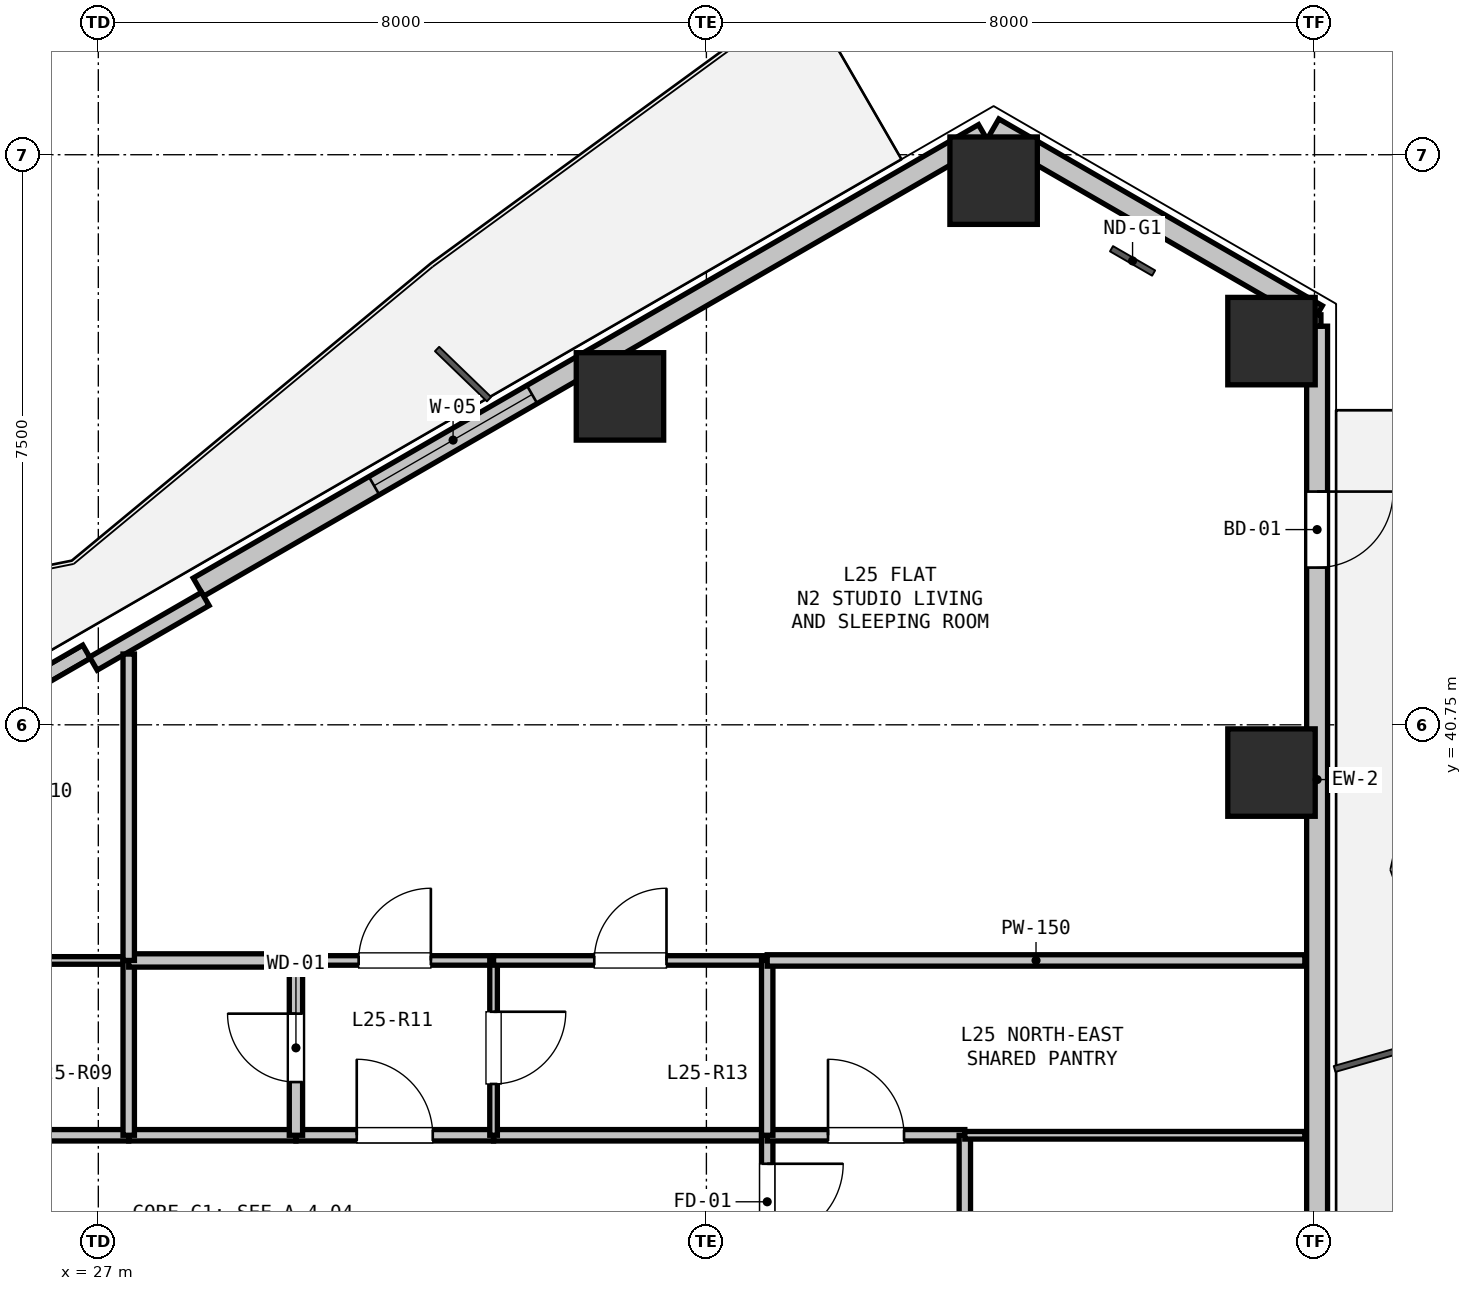
"""IFC4 building model, lengths in metres.
Left out: names, types, materials, properties, quantities, classifications, styles, units other than length and angle.
Written with IfcOpenShell. Run it as: python <this file> out.ifc"""

import sys

from ifc_helpers import new_model, si_unit, direction, frame, frame_2d, origin, origin_2d, place, context, subcontext, project, spatial, rectangle, hollow_rectangle, extrude, element, fill, save


model = new_model("IFC4")
c1 = context("Model", 3, precision=1e-05, world=origin(), true_north=direction((0.0, 1.0)))
c2 = subcontext(c1, "Body", "Model", "MODEL_VIEW")
j1 = project(units=[si_unit("LENGTHUNIT", "METRE"), si_unit("PLANEANGLEUNIT", "RADIAN")], contexts=[c1])
p1 = place(None, origin())
s1 = spatial("IfcSite", under=j1, at=p1, CompositionType="ELEMENT")
p2 = place(p1, origin())
s2 = spatial("IfcBuilding", under=s1, at=p2, CompositionType="ELEMENT")
p3 = place(p2, frame((0.0, 0.0, 93.3)))
s3 = spatial("IfcBuildingStorey", under=s2, at=p3, CompositionType="ELEMENT", Elevation=93.3)
for number, where, z_axis, x_axis in (
    (1, (33.863, 45.071, 0.0), (0.0, 0.0, 1.0), (1.0, 0.0, 0.0)),
    (2, (38.779, 47.909, 0.0), (0.0, 0.0, 1.0), (1.0, 0.0, 0.0)),
    (3, (42.435, 45.798, 0.0), (0.0, 0.0, 1.0), (1.0, 0.0, 0.0)),
    (4, (42.435, 40.122, 0.0), (0.0, 0.0, 1.0), (1.0, 0.0, 0.0)),
):
    element("IfcColumn", number, at=place(p3, frame(where, z_axis=z_axis, x_axis=x_axis)), inside=s3, PredefinedType="COLUMN", context=c2, shape_type="SweptSolid", body=[
        extrude(hollow_rectangle(XDim=1.15, YDim=1.15, WallThickness=0.032, at=origin_2d()), origin(), (0.0, 0.0, 1.0), 3.3),
    ])
p4 = place(p3, frame((38.779, 48.602, 0.0), z_axis=(0.0, 0.0, 1.0), x_axis=(0.866011848704, -0.500023477353, 0.0)))
e5 = element("IfcWall", 5, at=p4, inside=s3, PredefinedType="SOLIDWALL", context=c2, shape_type="SweptSolid", body=[
    extrude(rectangle(XDim=4.914, YDim=0.275, at=frame_2d((2.457, 0.0))), origin(), (0.0, 0.0, 1.0), 2.67),
])
p5 = place(p3, frame((17.12, 36.097, 0.0), z_axis=(0.0, 0.0, 1.0), x_axis=(0.866027010039, 0.499997217876, 0.0)))
e6 = element("IfcWall", 6, at=p5, inside=s3, PredefinedType="PARAPET", context=c2, shape_type="SweptSolid", body=[
    extrude(rectangle(XDim=11.229, YDim=0.2, at=frame_2d((5.615, 0.0))), origin(), (0.0, 0.0, 1.0), 0.2),
])
p6 = place(p3, frame((28.317, 42.562, 0.0), z_axis=(0.0, 0.0, 1.0), x_axis=(0.866023023012, 0.500004123596, 0.0)))
e7 = element("IfcWall", 7, at=p6, inside=s3, PredefinedType="SOLIDWALL", context=c2, shape_type="SweptSolid", body=[
    extrude(rectangle(XDim=11.93, YDim=0.275, at=frame_2d((5.965, 0.0))), origin(), (0.0, 0.0, 1.0), 2.67),
])
p7 = place(p6, frame((2.668, 0.0, 0.9)))
e8 = element("IfcOpeningElement", 8, at=p7, cuts=e7, PredefinedType="OPENING", context=c2, shape_type="SweptSolid", body=[
    extrude(rectangle(XDim=2.4, YDim=1.6, at=frame_2d((1.2, 0.8))), frame((0.0, 0.147, 0.0), z_axis=(0.0, -1.0, 0.0), x_axis=(1.0, 0.0, 0.0)), (0.0, 0.0, 1.0), 0.295),
])
p8 = place(p3, frame((26.935, 41.556, 0.0), z_axis=(0.0, 0.0, 1.0), x_axis=(0.86605165483, 0.499954529098, 0.0)))
e9 = element("IfcWall", 9, at=p8, inside=s3, PredefinedType="PARAPET", context=c2, shape_type="SweptSolid", body=[
    extrude(rectangle(XDim=1.7, YDim=0.2, at=frame_2d((0.85, 0.0))), origin(), (0.0, 0.0, 1.0), 2.67),
])
p9 = place(p3, frame((43.035, 45.994, 0.0), z_axis=(0.0, 0.0, 1.0), x_axis=(0.0, -1.0, 0.0)))
e10 = element("IfcWall", 10, at=p9, inside=s3, PredefinedType="SOLIDWALL", context=c2, shape_type="SweptSolid", body=[
    extrude(rectangle(XDim=11.93, YDim=0.275, at=frame_2d((5.965, 0.0))), origin(), (0.0, 0.0, 1.0), 2.67),
])
p10 = place(p9, frame((2.176, 0.0, 0.0)))
e11 = element("IfcOpeningElement", 11, at=p10, cuts=e10, PredefinedType="OPENING", context=c2, shape_type="SweptSolid", body=[
    extrude(rectangle(XDim=1.0, YDim=2.1, at=frame_2d((0.5, 1.05))), frame((0.0, 0.147, 0.0), z_axis=(0.0, -1.0, 0.0), x_axis=(1.0, 0.0, 0.0)), (0.0, 0.0, 1.0), 0.295),
])
p11 = place(p3, frame((24.2, 35.35, 0.0), z_axis=(0.0, 0.0, 1.0), x_axis=(1.0, 0.0, 0.0)))
e12 = element("IfcWall", 12, at=p11, inside=s3, PredefinedType="PARTITIONING", context=c2, shape_type="SweptSolid", body=[
    extrude(rectangle(XDim=3.2, YDim=0.15, at=frame_2d((1.6, 0.0))), origin(), (0.0, 0.0, 1.0), 3.05),
])
p12 = place(p3, frame((27.4, 35.35, 0.0), z_axis=(0.0, 0.0, 1.0), x_axis=(1.0, 0.0, 0.0)))
e13 = element("IfcWall", 13, at=p12, inside=s3, PredefinedType="PARTITIONING", context=c2, shape_type="SweptSolid", body=[
    extrude(rectangle(XDim=2.2, YDim=0.15, at=frame_2d((1.1, 0.0))), origin(), (0.0, 0.0, 1.0), 3.05),
])
p13 = place(p3, frame((29.6, 35.35, 0.0), z_axis=(0.0, 0.0, 1.0), x_axis=(1.0, 0.0, 0.0)))
e14 = element("IfcWall", 14, at=p13, inside=s3, PredefinedType="PARTITIONING", context=c2, shape_type="SweptSolid", body=[
    extrude(rectangle(XDim=2.6, YDim=0.15, at=frame_2d((1.3, 0.0))), origin(), (0.0, 0.0, 1.0), 3.05),
])
p14 = place(p13, frame((0.8, 0.0, 0.0)))
e15 = element("IfcOpeningElement", 15, at=p14, cuts=e14, PredefinedType="OPENING", context=c2, shape_type="SweptSolid", body=[
    extrude(rectangle(XDim=1.0, YDim=2.15, at=frame_2d((0.5, 1.075))), frame((0.0, 0.085, 0.0), z_axis=(0.0, -1.0, 0.0), x_axis=(1.0, 0.0, 0.0)), (0.0, 0.0, 1.0), 0.17),
])
p15 = place(p3, frame((32.2, 35.35, 0.0), z_axis=(0.0, 0.0, 1.0), x_axis=(1.0, 0.0, 0.0)))
e16 = element("IfcWall", 16, at=p15, inside=s3, PredefinedType="PARTITIONING", context=c2, shape_type="SweptSolid", body=[
    extrude(rectangle(XDim=3.6, YDim=0.15, at=frame_2d((1.8, 0.0))), origin(), (0.0, 0.0, 1.0), 3.05),
])
p16 = place(p3, frame((35.8, 35.35, 0.0), z_axis=(0.0, 0.0, 1.0), x_axis=(0.0, -1.0, 0.0)))
e17 = element("IfcWall", 17, at=p16, inside=s3, PredefinedType="PARTITIONING", context=c2, shape_type="SweptSolid", body=[
    extrude(rectangle(XDim=1.75, YDim=0.15, at=frame_2d((0.875, 0.0))), origin(), (0.0, 0.0, 1.0), 3.05),
])
p17 = place(p16, frame((0.375, 0.0, 0.0)))
e18 = element("IfcOpeningElement", 18, at=p17, cuts=e17, PredefinedType="OPENING", context=c2, shape_type="SweptSolid", body=[
    extrude(rectangle(XDim=1.0, YDim=2.15, at=frame_2d((0.5, 1.075))), frame((0.0, 0.085, 0.0), z_axis=(0.0, -1.0, 0.0), x_axis=(1.0, 0.0, 0.0)), (0.0, 0.0, 1.0), 0.17),
])
p18 = place(p3, frame((35.8, 35.35, 0.0), z_axis=(0.0, 0.0, 1.0), x_axis=(1.0, 0.0, 0.0)))
e19 = element("IfcWall", 19, at=p18, inside=s3, PredefinedType="PARTITIONING", context=c2, shape_type="SweptSolid", body=[
    extrude(rectangle(XDim=2.6, YDim=0.15, at=frame_2d((1.3, 0.0))), origin(), (0.0, 0.0, 1.0), 2.423),
])
p19 = place(p18, frame((0.8, 0.0, 0.0)))
e20 = element("IfcOpeningElement", 20, at=p19, cuts=e19, PredefinedType="OPENING", context=c2, shape_type="SweptSolid", body=[
    extrude(rectangle(XDim=1.0, YDim=2.15, at=frame_2d((0.5, 1.075))), frame((0.0, 0.085, 0.0), z_axis=(0.0, -1.0, 0.0), x_axis=(1.0, 0.0, 0.0)), (0.0, 0.0, 1.0), 0.17),
])
p20 = place(p3, frame((38.4, 35.35, 0.0), z_axis=(0.0, 0.0, 1.0), x_axis=(0.0, -1.0, 0.0)))
e21 = element("IfcWall", 21, at=p20, inside=s3, PredefinedType="PARTITIONING", context=c2, shape_type="SweptSolid", body=[
    extrude(rectangle(XDim=8.6, YDim=0.15, at=frame_2d((4.3, 0.0))), origin(), (0.0, 0.0, 1.0), 3.05),
])
p21 = place(p20, frame((3.8, 0.0, 0.0)))
e22 = element("IfcOpeningElement", 22, at=p21, cuts=e21, PredefinedType="OPENING", context=c2, shape_type="SweptSolid", body=[
    extrude(rectangle(XDim=1.0, YDim=2.15, at=frame_2d((0.5, 1.075))), frame((0.0, 0.085, 0.0), z_axis=(0.0, -1.0, 0.0), x_axis=(1.0, 0.0, 0.0)), (0.0, 0.0, 1.0), 0.17),
])
p22 = place(p3, frame((29.6, 37.65, 0.0), z_axis=(0.0, 0.0, 1.0), x_axis=(1.0, 0.0, 0.0)))
e23 = element("IfcWall", 23, at=p22, inside=s3, PredefinedType="PARTITIONING", context=c2, shape_type="SweptSolid", body=[
    extrude(rectangle(XDim=2.6, YDim=0.125, at=frame_2d((1.3, 0.0))), origin(), (0.0, 0.0, 1.0), 3.05),
])
p23 = place(p22, frame((0.825, 0.0, 0.0)))
e24 = element("IfcOpeningElement", 24, at=p23, cuts=e23, PredefinedType="OPENING", context=c2, shape_type="SweptSolid", body=[
    extrude(rectangle(XDim=0.95, YDim=2.1, at=frame_2d((0.475, 1.05))), frame((0.0, 0.073, 0.0), z_axis=(0.0, -1.0, 0.0), x_axis=(1.0, 0.0, 0.0)), (0.0, 0.0, 1.0), 0.145),
])
p24 = place(p3, frame((32.2, 37.65, 0.0), z_axis=(0.0, 0.0, 1.0), x_axis=(0.0, -1.0, 0.0)))
e25 = element("IfcWall", 25, at=p24, inside=s3, PredefinedType="PARTITIONING", context=c2, shape_type="SweptSolid", body=[
    extrude(rectangle(XDim=2.3, YDim=0.1, at=frame_2d((1.15, 0.0))), origin(), (0.0, 0.0, 1.0), 3.05),
])
p25 = place(p24, frame((0.675, 0.0, 0.0)))
e26 = element("IfcOpeningElement", 26, at=p25, cuts=e25, PredefinedType="OPENING", context=c2, shape_type="SweptSolid", body=[
    extrude(rectangle(XDim=0.95, YDim=2.1, at=frame_2d((0.475, 1.05))), frame((0.0, 0.06, 0.0), z_axis=(0.0, -1.0, 0.0), x_axis=(1.0, 0.0, 0.0)), (0.0, 0.0, 1.0), 0.12),
])
p26 = place(p3, frame((29.6, 35.35, 0.0), z_axis=(0.0, 0.0, 1.0), x_axis=(0.0, 1.0, 0.0)))
e27 = element("IfcWall", 27, at=p26, inside=s3, PredefinedType="PLUMBINGWALL", context=c2, shape_type="SweptSolid", body=[
    extrude(rectangle(XDim=2.3, YDim=0.175, at=frame_2d((1.15, 0.0))), origin(), (0.0, 0.0, 1.0), 3.05),
])
p27 = place(p26, frame((0.7, 0.0, 0.0)))
e28 = element("IfcOpeningElement", 28, at=p27, cuts=e27, PredefinedType="OPENING", context=c2, shape_type="SweptSolid", body=[
    extrude(rectangle(XDim=0.9, YDim=2.1, at=frame_2d((0.45, 1.05))), frame((0.0, 0.097, 0.0), z_axis=(0.0, -1.0, 0.0), x_axis=(1.0, 0.0, 0.0)), (0.0, 0.0, 1.0), 0.195),
])
p28 = place(p3, frame((24.2, 37.65, 0.0), z_axis=(0.0, 0.0, 1.0), x_axis=(1.0, 0.0, 0.0)))
e29 = element("IfcWall", 29, at=p28, inside=s3, PredefinedType="PARTITIONING", context=c2, shape_type="SweptSolid", body=[
    extrude(rectangle(XDim=3.2, YDim=0.1, at=frame_2d((1.6, 0.0))), origin(), (0.0, 0.0, 1.0), 3.05),
])
p29 = place(p28, frame((1.125, 0.0, 0.0)))
e30 = element("IfcOpeningElement", 30, at=p29, cuts=e29, PredefinedType="OPENING", context=c2, shape_type="SweptSolid", body=[
    extrude(rectangle(XDim=0.95, YDim=2.1, at=frame_2d((0.475, 1.05))), frame((0.0, 0.06, 0.0), z_axis=(0.0, -1.0, 0.0), x_axis=(1.0, 0.0, 0.0)), (0.0, 0.0, 1.0), 0.12),
])
p30 = place(p3, frame((27.4, 37.65, 0.0), z_axis=(0.0, 0.0, 1.0), x_axis=(0.0, -1.0, 0.0)))
e31 = element("IfcWall", 31, at=p30, inside=s3, PredefinedType="PARTITIONING", context=c2, shape_type="SweptSolid", body=[
    extrude(rectangle(XDim=2.3, YDim=0.15, at=frame_2d((1.15, 0.0))), origin(), (0.0, 0.0, 1.0), 3.05),
])
p31 = place(p3, frame((27.4, 37.65, 0.0), z_axis=(0.0, 0.0, 1.0), x_axis=(1.0, 0.0, 0.0)))
e32 = element("IfcWall", 32, at=p31, inside=s3, PredefinedType="PLUMBINGWALL", context=c2, shape_type="SweptSolid", body=[
    extrude(rectangle(XDim=2.2, YDim=0.175, at=frame_2d((1.1, 0.0))), origin(), (0.0, 0.0, 1.0), 3.05),
])
p32 = place(p3, frame((32.2, 37.65, 0.0), z_axis=(0.0, 0.0, 1.0), x_axis=(1.0, 0.0, 0.0)))
e33 = element("IfcWall", 33, at=p32, inside=s3, PredefinedType="PARTITIONING", context=c2, shape_type="SweptSolid", body=[
    extrude(rectangle(XDim=3.6, YDim=0.125, at=frame_2d((1.8, 0.0))), origin(), (0.0, 0.0, 1.0), 3.05),
])
p33 = place(p32, frame((1.325, 0.0, 0.0)))
e34 = element("IfcOpeningElement", 34, at=p33, cuts=e33, PredefinedType="OPENING", context=c2, shape_type="SweptSolid", body=[
    extrude(rectangle(XDim=0.95, YDim=2.1, at=frame_2d((0.475, 1.05))), frame((0.0, 0.073, 0.0), z_axis=(0.0, -1.0, 0.0), x_axis=(1.0, 0.0, 0.0)), (0.0, 0.0, 1.0), 0.145),
])
p34 = place(p3, frame((35.8, 37.65, 0.0), z_axis=(0.0, 0.0, 1.0), x_axis=(0.0, -1.0, 0.0)))
e35 = element("IfcWall", 35, at=p34, inside=s3, PredefinedType="PARTITIONING", context=c2, shape_type="SweptSolid", body=[
    extrude(rectangle(XDim=2.3, YDim=0.15, at=frame_2d((1.15, 0.0))), origin(), (0.0, 0.0, 1.0), 3.05),
])
p35 = place(p3, frame((42.873, 35.35, 0.0), z_axis=(0.0, 0.0, 1.0), x_axis=(-1.0, 0.0, 0.0)))
e36 = element("IfcWall", 36, at=p35, inside=s3, PredefinedType="PARTITIONING", context=c2, shape_type="SweptSolid", body=[
    extrude(rectangle(XDim=4.473, YDim=0.1, at=frame_2d((2.237, 0.0))), origin(), (0.0, 0.0, 1.0), 2.365),
])
p36 = place(p3, frame((35.8, 37.65, 0.0), z_axis=(0.0, 0.0, 1.0), x_axis=(1.0, 0.0, 0.0)))
e37 = element("IfcWall", 37, at=p36, inside=s3, PredefinedType="PARTITIONING", context=c2, shape_type="SweptSolid", body=[
    extrude(rectangle(XDim=7.073, YDim=0.15, at=frame_2d((3.537, 0.0))), origin(), (0.0, 0.0, 1.0), 2.365),
])
p37 = place(p3, frame((27.4, 41.681, 0.0), z_axis=(0.0, 0.0, 1.0), x_axis=(0.0, -1.0, 0.0)))
e38 = element("IfcWall", 38, at=p37, inside=s3, PredefinedType="PARTITIONING", context=c2, shape_type="SweptSolid", body=[
    extrude(rectangle(XDim=4.031, YDim=0.15, at=frame_2d((2.016, 0.0))), origin(), (0.0, 0.0, 1.0), 2.365),
])
p38 = place(p3, frame((43.035, 46.144, 0.0), z_axis=(0.0, 0.0, 1.0), x_axis=(0.0, -1.0, 0.0)))
e39 = element("IfcWall", 39, at=p38, inside=s3, PredefinedType="PARTITIONING", context=c2, shape_type="SweptSolid", body=[
    extrude(rectangle(XDim=0.15, YDim=0.1, at=frame_2d((0.075, 0.0))), origin(), (0.0, 0.0, 1.0), 3.05),
])
p39 = place(p7, origin())
e40 = element("IfcWindow", 40, at=p39, inside=s3, PartitioningType="SINGLE_PANEL", PredefinedType="WINDOW", context=c2, shape_type="SweptSolid", body=[
    extrude(rectangle(XDim=2.4, YDim=1.6, at=frame_2d((1.2, 0.8))), frame((0.0, 0.03, 0.0), z_axis=(0.0, -1.0, 0.0), x_axis=(1.0, 0.0, 0.0)), (0.0, 0.0, 1.0), 0.06),
])
fill(e8, e40)
p40 = place(p10, origin())
e41 = element("IfcDoor", 41, at=p40, inside=s3, OperationType="SINGLE_SWING_LEFT", PredefinedType="DOOR", context=c2, shape_type="SweptSolid", body=[
    extrude(rectangle(XDim=1.0, YDim=2.1, at=frame_2d((0.5, 1.05))), frame((0.0, 0.025, 0.0), z_axis=(0.0, -1.0, 0.0), x_axis=(1.0, 0.0, 0.0)), (0.0, 0.0, 1.0), 0.05),
])
fill(e11, e41)
p41 = place(p17, origin())
e42 = element("IfcDoor", 42, at=p41, inside=s3, OperationType="SINGLE_SWING_LEFT", PredefinedType="DOOR", context=c2, shape_type="SweptSolid", body=[
    extrude(rectangle(XDim=1.0, YDim=2.15, at=frame_2d((0.5, 1.075))), frame((0.0, 0.025, 0.0), z_axis=(0.0, -1.0, 0.0), x_axis=(1.0, 0.0, 0.0)), (0.0, 0.0, 1.0), 0.05),
])
fill(e18, e42)
p42 = place(p14, origin())
e43 = element("IfcDoor", 43, at=p42, inside=s3, OperationType="SINGLE_SWING_LEFT", PredefinedType="DOOR", context=c2, shape_type="SweptSolid", body=[
    extrude(rectangle(XDim=1.0, YDim=2.15, at=frame_2d((0.5, 1.075))), frame((0.0, 0.025, 0.0), z_axis=(0.0, -1.0, 0.0), x_axis=(1.0, 0.0, 0.0)), (0.0, 0.0, 1.0), 0.05),
])
fill(e15, e43)
p43 = place(p19, origin())
e44 = element("IfcDoor", 44, at=p43, inside=s3, OperationType="SINGLE_SWING_LEFT", PredefinedType="DOOR", context=c2, shape_type="SweptSolid", body=[
    extrude(rectangle(XDim=1.0, YDim=2.15, at=frame_2d((0.5, 1.075))), frame((0.0, 0.025, 0.0), z_axis=(0.0, -1.0, 0.0), x_axis=(1.0, 0.0, 0.0)), (0.0, 0.0, 1.0), 0.05),
])
fill(e20, e44)
p44 = place(p27, origin())
e45 = element("IfcDoor", 45, at=p44, inside=s3, OperationType="SINGLE_SWING_RIGHT", PredefinedType="DOOR", context=c2, shape_type="SweptSolid", body=[
    extrude(rectangle(XDim=0.9, YDim=2.1, at=frame_2d((0.45, 1.05))), frame((0.0, 0.025, 0.0), z_axis=(0.0, -1.0, 0.0), x_axis=(1.0, 0.0, 0.0)), (0.0, 0.0, 1.0), 0.05),
])
fill(e28, e45)
p45 = place(p25, origin())
e46 = element("IfcDoor", 46, at=p45, inside=s3, OperationType="SINGLE_SWING_LEFT", PredefinedType="DOOR", context=c2, shape_type="SweptSolid", body=[
    extrude(rectangle(XDim=0.95, YDim=2.1, at=frame_2d((0.475, 1.05))), frame((0.0, 0.025, 0.0), z_axis=(0.0, -1.0, 0.0), x_axis=(1.0, 0.0, 0.0)), (0.0, 0.0, 1.0), 0.05),
])
fill(e26, e46)
p46 = place(p23, origin())
e47 = element("IfcDoor", 47, at=p46, inside=s3, OperationType="SINGLE_SWING_RIGHT", PredefinedType="DOOR", context=c2, shape_type="SweptSolid", body=[
    extrude(rectangle(XDim=0.95, YDim=2.1, at=frame_2d((0.475, 1.05))), frame((0.0, 0.025, 0.0), z_axis=(0.0, -1.0, 0.0), x_axis=(1.0, 0.0, 0.0)), (0.0, 0.0, 1.0), 0.05),
])
fill(e24, e47)
p47 = place(p33, origin())
e48 = element("IfcDoor", 48, at=p47, inside=s3, OperationType="SINGLE_SWING_RIGHT", PredefinedType="DOOR", context=c2, shape_type="SweptSolid", body=[
    extrude(rectangle(XDim=0.95, YDim=2.1, at=frame_2d((0.475, 1.05))), frame((0.0, 0.025, 0.0), z_axis=(0.0, -1.0, 0.0), x_axis=(1.0, 0.0, 0.0)), (0.0, 0.0, 1.0), 0.05),
])
fill(e34, e48)
save(model, sys.argv[1])
